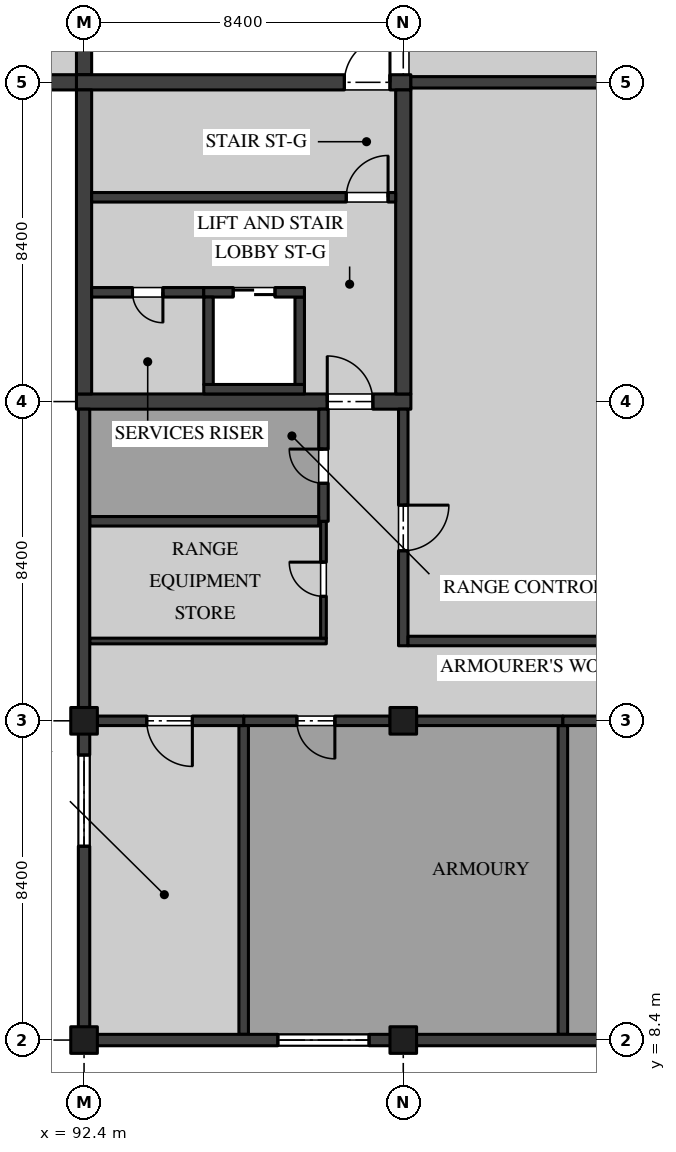
"""IFC4 building model, lengths in metres.
Left out: names, types, materials, properties, quantities, classifications, styles, units other than length and angle.
Written with IfcOpenShell. Run it as: python <this file> out.ifc"""

import sys

from ifc_helpers import new_model, si_unit, direction, frame, frame_2d, origin, origin_2d, place, context, subcontext, project, spatial, rectangle, extrude, element, fill, save


model = new_model("IFC4")
c1 = context("Model", 3, precision=1e-05, world=origin(), true_north=direction((0.0, 1.0)))
c2 = subcontext(c1, "Body", "Model", "MODEL_VIEW")
j1 = project(units=[si_unit("LENGTHUNIT", "METRE"), si_unit("PLANEANGLEUNIT", "RADIAN")], contexts=[c1])
p1 = place(None, origin())
s1 = spatial("IfcSite", under=j1, at=p1, CompositionType="ELEMENT")
p2 = place(p1, origin())
s2 = spatial("IfcBuilding", under=s1, at=p2, CompositionType="ELEMENT")
p3 = place(p2, origin())
s3 = spatial("IfcBuildingStorey", under=s2, at=p3, CompositionType="ELEMENT", Elevation=0.0)
for number, where, z_axis, x_axis in (
    (1, (92.4, 8.4, 0.0), (0.0, 0.0, 1.0), (1.0, 0.0, 0.0)),
    (2, (92.4, 16.8, 0.0), (0.0, 0.0, 1.0), (1.0, 0.0, 0.0)),
    (3, (100.8, 8.4, 0.0), (0.0, 0.0, 1.0), (1.0, 0.0, 0.0)),
    (4, (100.8, 16.8, 0.0), (0.0, 0.0, 1.0), (1.0, 0.0, 0.0)),
):
    element("IfcColumn", number, at=place(p3, frame(where, z_axis=z_axis, x_axis=x_axis)), inside=s3, PredefinedType="COLUMN", context=c2, shape_type="SweptSolid", body=[
        extrude(rectangle(XDim=0.7, YDim=0.7, at=origin_2d()), origin(), (0.0, 0.0, 1.0), 5.05),
    ])
p4 = place(p3, frame((83.8, 33.6, 0.0), z_axis=(0.0, 0.0, 1.0), x_axis=(1.0, 0.0, 0.0)))
e5 = element("IfcWall", 5, at=p4, inside=s3, PredefinedType="SHEAR", context=c2, shape_type="SweptSolid", body=[
    extrude(rectangle(XDim=8.8, YDim=0.4, at=frame_2d((4.4, 0.0))), origin(), (0.0, 0.0, 1.0), 5.05),
])
p5 = place(p4, frame((0.55, 0.0, 0.0)))
e6 = element("IfcOpeningElement", 6, at=p5, cuts=e5, PredefinedType="OPENING", context=c2, shape_type="SweptSolid", body=[
    extrude(rectangle(XDim=1.2, YDim=2.1, at=frame_2d((0.6, 1.05))), frame((0.0, 0.21, 0.0), z_axis=(0.0, -1.0, 0.0), x_axis=(1.0, 0.0, 0.0)), (0.0, 0.0, 1.0), 0.42),
])
p6 = place(p3, frame((92.4, 33.8, 0.0), z_axis=(0.0, 0.0, 1.0), x_axis=(0.0, 1.0, 0.0)))
e7 = element("IfcWall", 7, at=p6, inside=s3, PredefinedType="SHEAR", context=c2, shape_type="SweptSolid", body=[
    extrude(rectangle(XDim=8.0, YDim=0.4, at=frame_2d((4.0, 0.0))), origin(), (0.0, 0.0, 1.0), 5.05),
])
p7 = place(p3, frame((92.2, 25.2, 0.0), z_axis=(0.0, 0.0, 1.0), x_axis=(1.0, 0.0, 0.0)))
e8 = element("IfcWall", 8, at=p7, inside=s3, PredefinedType="SHEAR", context=c2, shape_type="SweptSolid", body=[
    extrude(rectangle(XDim=8.8, YDim=0.4, at=frame_2d((4.4, 0.0))), origin(), (0.0, 0.0, 1.0), 5.05),
])
p8 = place(p7, frame((6.6, 0.0, 0.0)))
e9 = element("IfcOpeningElement", 9, at=p8, cuts=e8, PredefinedType="OPENING", context=c2, shape_type="SweptSolid", body=[
    extrude(rectangle(XDim=1.2, YDim=2.1, at=frame_2d((0.6, 1.05))), frame((0.0, 0.21, 0.0), z_axis=(0.0, -1.0, 0.0), x_axis=(1.0, 0.0, 0.0)), (0.0, 0.0, 1.0), 0.42),
])
p9 = place(p3, frame((92.2, 33.6, 0.0), z_axis=(0.0, 0.0, 1.0), x_axis=(1.0, 0.0, 0.0)))
e10 = element("IfcWall", 10, at=p9, inside=s3, PredefinedType="SHEAR", context=c2, shape_type="SweptSolid", body=[
    extrude(rectangle(XDim=8.8, YDim=0.4, at=frame_2d((4.4, 0.0))), origin(), (0.0, 0.0, 1.0), 5.05),
])
p10 = place(p9, frame((7.05, 0.0, 0.0)))
e11 = element("IfcOpeningElement", 11, at=p10, cuts=e10, PredefinedType="OPENING", context=c2, shape_type="SweptSolid", body=[
    extrude(rectangle(XDim=1.2, YDim=2.1, at=frame_2d((0.6, 1.05))), frame((0.0, 0.21, 0.0), z_axis=(0.0, -1.0, 0.0), x_axis=(1.0, 0.0, 0.0)), (0.0, 0.0, 1.0), 0.42),
])
for number, where, z_axis, x_axis in (
    (12, (92.4, 25.4, 0.0), (0.0, 0.0, 1.0), (0.0, 1.0, 0.0)),
    (13, (100.8, 25.4, 0.0), (0.0, 0.0, 1.0), (0.0, 1.0, 0.0)),
):
    element("IfcWall", number, at=place(p3, frame(where, z_axis=z_axis, x_axis=x_axis)), inside=s3, PredefinedType="SHEAR", context=c2, shape_type="SweptSolid", body=[
        extrude(rectangle(XDim=8.0, YDim=0.4, at=frame_2d((4.0, 0.0))), origin(), (0.0, 0.0, 1.0), 5.05),
    ])
p11 = place(p3, frame((100.6, 30.575, 0.0), z_axis=(0.0, 0.0, 1.0), x_axis=(-1.0, 0.0, 0.0)))
e14 = element("IfcWall", 14, at=p11, inside=s3, PredefinedType="SOLIDWALL", context=c2, shape_type="SweptSolid", body=[
    extrude(rectangle(XDim=8.0, YDim=0.25, at=frame_2d((4.0, 0.0))), origin(), (0.0, 0.0, 1.0), 5.05),
])
p12 = place(p11, frame((0.2, 0.0, 0.0)))
e15 = element("IfcOpeningElement", 15, at=p12, cuts=e14, PredefinedType="OPENING", context=c2, shape_type="SweptSolid", body=[
    extrude(rectangle(XDim=1.1, YDim=2.1, at=frame_2d((0.55, 1.05))), frame((0.0, 0.135, 0.0), z_axis=(0.0, -1.0, 0.0), x_axis=(1.0, 0.0, 0.0)), (0.0, 0.0, 1.0), 0.27),
])
p13 = place(p3, frame((95.55, 28.075, 0.0), z_axis=(0.0, 0.0, 1.0), x_axis=(-1.0, 0.0, 0.0)))
e16 = element("IfcWall", 16, at=p13, inside=s3, PredefinedType="SOLIDWALL", context=c2, shape_type="SweptSolid", body=[
    extrude(rectangle(XDim=2.95, YDim=0.25, at=frame_2d((1.475, 0.0))), origin(), (0.0, 0.0, 1.0), 5.05),
])
p14 = place(p13, frame((1.075, 0.0, 0.0)))
e17 = element("IfcOpeningElement", 17, at=p14, cuts=e16, PredefinedType="OPENING", context=c2, shape_type="SweptSolid", body=[
    extrude(rectangle(XDim=0.8, YDim=2.1, at=frame_2d((0.4, 1.05))), frame((0.0, 0.135, 0.0), z_axis=(0.0, -1.0, 0.0), x_axis=(1.0, 0.0, 0.0)), (0.0, 0.0, 1.0), 0.27),
])
p15 = place(p3, frame((98.075, 25.65, 0.0), z_axis=(0.0, 0.0, 1.0), x_axis=(0.0, 1.0, 0.0)))
e18 = element("IfcWall", 18, at=p15, inside=s3, PredefinedType="SOLIDWALL", context=c2, shape_type="SweptSolid", body=[
    extrude(rectangle(XDim=2.3, YDim=0.25, at=frame_2d((1.15, 0.0))), origin(), (0.0, 0.0, 1.0), 5.05),
])
p16 = place(p3, frame((95.55, 28.075, 0.0), z_axis=(0.0, 0.0, 1.0), x_axis=(1.0, 0.0, 0.0)))
e19 = element("IfcWall", 19, at=p16, inside=s3, PredefinedType="SOLIDWALL", context=c2, shape_type="SweptSolid", body=[
    extrude(rectangle(XDim=2.65, YDim=0.25, at=frame_2d((1.325, 0.0))), origin(), (0.0, 0.0, 1.0), 5.05),
])
p17 = place(p16, frame((0.775, 0.0, 0.0)))
e20 = element("IfcOpeningElement", 20, at=p17, cuts=e19, PredefinedType="OPENING", context=c2, shape_type="SweptSolid", body=[
    extrude(rectangle(XDim=1.1, YDim=2.1, at=frame_2d((0.55, 1.05))), frame((0.0, 0.135, 0.0), z_axis=(0.0, -1.0, 0.0), x_axis=(1.0, 0.0, 0.0)), (0.0, 0.0, 1.0), 0.27),
])
p18 = place(p3, frame((95.55, 25.525, 0.0), z_axis=(0.0, 0.0, 1.0), x_axis=(1.0, 0.0, 0.0)))
e21 = element("IfcWall", 21, at=p18, inside=s3, PredefinedType="SOLIDWALL", context=c2, shape_type="SweptSolid", body=[
    extrude(rectangle(XDim=2.65, YDim=0.25, at=frame_2d((1.325, 0.0))), origin(), (0.0, 0.0, 1.0), 5.05),
])
p19 = place(p3, frame((95.675, 25.65, 0.0), z_axis=(0.0, 0.0, 1.0), x_axis=(0.0, 1.0, 0.0)))
e22 = element("IfcWall", 22, at=p19, inside=s3, PredefinedType="SOLIDWALL", context=c2, shape_type="SweptSolid", body=[
    extrude(rectangle(XDim=2.3, YDim=0.25, at=frame_2d((1.15, 0.0))), origin(), (0.0, 0.0, 1.0), 5.05),
])
p20 = place(p3, frame((105.0, 8.55, 0.0), z_axis=(0.0, 0.0, 1.0), x_axis=(0.0, 1.0, 0.0)))
e23 = element("IfcWall", 23, at=p20, inside=s3, PredefinedType="PARTITIONING", context=c2, shape_type="SweptSolid", body=[
    extrude(rectangle(XDim=8.125, YDim=0.25, at=frame_2d((4.062, 0.0))), origin(), (0.0, 0.0, 1.0), 5.05),
])
p21 = place(p3, frame((96.6, 16.8, 0.0), z_axis=(0.0, 0.0, 1.0), x_axis=(1.0, 0.0, 0.0)))
e24 = element("IfcWall", 24, at=p21, inside=s3, PredefinedType="PARTITIONING", context=c2, shape_type="SweptSolid", body=[
    extrude(rectangle(XDim=3.85, YDim=0.25, at=frame_2d((1.925, 0.0))), origin(), (0.0, 0.0, 1.0), 5.05),
])
p22 = place(p21, frame((1.4, 0.0, 0.0)))
e25 = element("IfcOpeningElement", 25, at=p22, cuts=e24, PredefinedType="OPENING", context=c2, shape_type="SweptSolid", body=[
    extrude(rectangle(XDim=1.0, YDim=2.1, at=frame_2d((0.5, 1.05))), frame((0.0, 0.135, 0.0), z_axis=(0.0, -1.0, 0.0), x_axis=(1.0, 0.0, 0.0)), (0.0, 0.0, 1.0), 0.27),
])
p23 = place(p3, frame((101.15, 16.8, 0.0), z_axis=(0.0, 0.0, 1.0), x_axis=(1.0, 0.0, 0.0)))
e26 = element("IfcWall", 26, at=p23, inside=s3, PredefinedType="PARTITIONING", context=c2, shape_type="SweptSolid", body=[
    extrude(rectangle(XDim=3.85, YDim=0.25, at=frame_2d((1.925, 0.0))), origin(), (0.0, 0.0, 1.0), 5.05),
])
p24 = place(p3, frame((96.6, 8.55, 0.0), z_axis=(0.0, 0.0, 1.0), x_axis=(0.0, 1.0, 0.0)))
e27 = element("IfcWall", 27, at=p24, inside=s3, PredefinedType="PARTITIONING", context=c2, shape_type="SweptSolid", body=[
    extrude(rectangle(XDim=8.125, YDim=0.25, at=frame_2d((4.062, 0.0))), origin(), (0.0, 0.0, 1.0), 5.05),
])
p25 = place(p3, frame((105.0, 16.8, 0.0), z_axis=(0.0, 0.0, 1.0), x_axis=(1.0, 0.0, 0.0)))
e28 = element("IfcWall", 28, at=p25, inside=s3, PredefinedType="PARTITIONING", context=c2, shape_type="SweptSolid", body=[
    extrude(rectangle(XDim=4.0, YDim=0.25, at=frame_2d((2.0, 0.0))), origin(), (0.0, 0.0, 1.0), 5.05),
])
p26 = place(p25, frame((1.1, 0.0, 0.0)))
e29 = element("IfcOpeningElement", 29, at=p26, cuts=e28, PredefinedType="OPENING", context=c2, shape_type="SweptSolid", body=[
    extrude(rectangle(XDim=1.8, YDim=2.7, at=frame_2d((0.9, 1.35))), frame((0.0, 0.135, 0.0), z_axis=(0.0, -1.0, 0.0), x_axis=(1.0, 0.0, 0.0)), (0.0, 0.0, 1.0), 0.27),
])
p27 = place(p3, frame((92.55, 18.9, 0.0), z_axis=(0.0, 0.0, 1.0), x_axis=(1.0, 0.0, 0.0)))
e30 = element("IfcWall", 30, at=p27, inside=s3, PredefinedType="PARTITIONING", context=c2, shape_type="SweptSolid", body=[
    extrude(rectangle(XDim=6.225, YDim=0.15, at=frame_2d((3.112, 0.0))), origin(), (0.0, 0.0, 1.0), 5.05),
])
p28 = place(p3, frame((98.7, 18.975, 0.0), z_axis=(0.0, 0.0, 1.0), x_axis=(0.0, 1.0, 0.0)))
e31 = element("IfcWall", 31, at=p28, inside=s3, PredefinedType="PARTITIONING", context=c2, shape_type="SweptSolid", body=[
    extrude(rectangle(XDim=3.075, YDim=0.15, at=frame_2d((1.538, 0.0))), origin(), (0.0, 0.0, 1.0), 5.05),
])
p29 = place(p28, frame((1.1, 0.0, 0.0)))
e32 = element("IfcOpeningElement", 32, at=p29, cuts=e31, PredefinedType="OPENING", context=c2, shape_type="SweptSolid", body=[
    extrude(rectangle(XDim=0.9, YDim=2.1, at=frame_2d((0.45, 1.05))), frame((0.0, 0.085, 0.0), z_axis=(0.0, -1.0, 0.0), x_axis=(1.0, 0.0, 0.0)), (0.0, 0.0, 1.0), 0.17),
])
p30 = place(p3, frame((98.7, 22.05, 0.0), z_axis=(0.0, 0.0, 1.0), x_axis=(0.0, 1.0, 0.0)))
e33 = element("IfcWall", 33, at=p30, inside=s3, PredefinedType="PARTITIONING", context=c2, shape_type="SweptSolid", body=[
    extrude(rectangle(XDim=2.95, YDim=0.25, at=frame_2d((1.475, 0.0))), origin(), (0.0, 0.0, 1.0), 5.05),
])
p31 = place(p30, frame((1.0, 0.0, 0.0)))
e34 = element("IfcOpeningElement", 34, at=p31, cuts=e33, PredefinedType="OPENING", context=c2, shape_type="SweptSolid", body=[
    extrude(rectangle(XDim=0.9, YDim=2.1, at=frame_2d((0.45, 1.05))), frame((0.0, 0.135, 0.0), z_axis=(0.0, -1.0, 0.0), x_axis=(1.0, 0.0, 0.0)), (0.0, 0.0, 1.0), 0.27),
])
p32 = place(p3, frame((100.8, 18.775, 0.0), z_axis=(0.0, 0.0, 1.0), x_axis=(0.0, 1.0, 0.0)))
e35 = element("IfcWall", 35, at=p32, inside=s3, PredefinedType="PARTITIONING", context=c2, shape_type="SweptSolid", body=[
    extrude(rectangle(XDim=6.225, YDim=0.25, at=frame_2d((3.113, 0.0))), origin(), (0.0, 0.0, 1.0), 5.05),
])
p33 = place(p32, frame((2.5, 0.0, 0.0)))
e36 = element("IfcOpeningElement", 36, at=p33, cuts=e35, PredefinedType="OPENING", context=c2, shape_type="SweptSolid", body=[
    extrude(rectangle(XDim=1.2, YDim=2.1, at=frame_2d((0.6, 1.05))), frame((0.0, 0.135, 0.0), z_axis=(0.0, -1.0, 0.0), x_axis=(1.0, 0.0, 0.0)), (0.0, 0.0, 1.0), 0.27),
])
p34 = place(p3, frame((100.925, 18.9, 0.0), z_axis=(0.0, 0.0, 1.0), x_axis=(1.0, 0.0, 0.0)))
e37 = element("IfcWall", 37, at=p34, inside=s3, PredefinedType="PARTITIONING", context=c2, shape_type="SweptSolid", body=[
    extrude(rectangle(XDim=16.55, YDim=0.25, at=frame_2d((8.275, 0.0))), origin(), (0.0, 0.0, 1.0), 5.05),
])
p35 = place(p34, frame((7.65, 0.0, 0.0)))
e38 = element("IfcOpeningElement", 38, at=p35, cuts=e37, PredefinedType="OPENING", context=c2, shape_type="SweptSolid", body=[
    extrude(rectangle(XDim=1.2, YDim=2.1, at=frame_2d((0.6, 1.05))), frame((0.0, 0.135, 0.0), z_axis=(0.0, -1.0, 0.0), x_axis=(1.0, 0.0, 0.0)), (0.0, 0.0, 1.0), 0.27),
])
p36 = place(p3, frame((92.75, 16.8, 0.0), z_axis=(0.0, 0.0, 1.0), x_axis=(1.0, 0.0, 0.0)))
e39 = element("IfcWall", 39, at=p36, inside=s3, PredefinedType="PARTITIONING", context=c2, shape_type="SweptSolid", body=[
    extrude(rectangle(XDim=3.85, YDim=0.25, at=frame_2d((1.925, 0.0))), origin(), (0.0, 0.0, 1.0), 5.05),
])
p37 = place(p36, frame((1.3, 0.0, 0.0)))
e40 = element("IfcOpeningElement", 40, at=p37, cuts=e39, PredefinedType="OPENING", context=c2, shape_type="SweptSolid", body=[
    extrude(rectangle(XDim=1.2, YDim=2.4, at=frame_2d((0.6, 1.2))), frame((0.0, 0.135, 0.0), z_axis=(0.0, -1.0, 0.0), x_axis=(1.0, 0.0, 0.0)), (0.0, 0.0, 1.0), 0.27),
])
p38 = place(p3, frame((92.55, 22.05, 0.0), z_axis=(0.0, 0.0, 1.0), x_axis=(1.0, 0.0, 0.0)))
e41 = element("IfcWall", 41, at=p38, inside=s3, PredefinedType="PARTITIONING", context=c2, shape_type="SweptSolid", body=[
    extrude(rectangle(XDim=6.025, YDim=0.25, at=frame_2d((3.012, 0.0))), origin(), (0.0, 0.0, 1.0), 5.05),
])
p39 = place(p3, frame((92.4, 25.0, 0.0), z_axis=(0.0, 0.0, 1.0), x_axis=(0.0, -1.0, 0.0)))
e42 = element("IfcWall", 42, at=p39, inside=s3, PredefinedType="SOLIDWALL", context=c2, shape_type="SweptSolid", body=[
    extrude(rectangle(XDim=7.87, YDim=0.3, at=frame_2d((3.935, 0.0))), origin(), (0.0, 0.0, 1.0), 5.05),
])
p40 = place(p3, frame((92.4, 16.47, 0.0), z_axis=(0.0, 0.0, 1.0), x_axis=(0.0, -1.0, 0.0)))
e43 = element("IfcWall", 43, at=p40, inside=s3, PredefinedType="SOLIDWALL", context=c2, shape_type="SweptSolid", body=[
    extrude(rectangle(XDim=7.74, YDim=0.3, at=frame_2d((3.87, 0.0))), origin(), (0.0, 0.0, 1.0), 5.05),
])
p41 = place(p40, frame((0.57, 0.0, 0.6)))
e44 = element("IfcOpeningElement", 44, at=p41, cuts=e43, PredefinedType="OPENING", context=c2, shape_type="SweptSolid", body=[
    extrude(rectangle(XDim=2.4, YDim=2.1, at=frame_2d((1.2, 1.05))), frame((0.0, 0.16, 0.0), z_axis=(0.0, -1.0, 0.0), x_axis=(1.0, 0.0, 0.0)), (0.0, 0.0, 1.0), 0.32),
])
p42 = place(p3, frame((92.73, 8.4, 0.0), z_axis=(0.0, 0.0, 1.0), x_axis=(1.0, 0.0, 0.0)))
e45 = element("IfcWall", 45, at=p42, inside=s3, PredefinedType="SOLIDWALL", context=c2, shape_type="SweptSolid", body=[
    extrude(rectangle(XDim=7.74, YDim=0.3, at=frame_2d((3.87, 0.0))), origin(), (0.0, 0.0, 1.0), 5.05),
])
p43 = place(p42, frame((4.77, 0.0, 0.6)))
e46 = element("IfcOpeningElement", 46, at=p43, cuts=e45, PredefinedType="OPENING", context=c2, shape_type="SweptSolid", body=[
    extrude(rectangle(XDim=2.4, YDim=2.1, at=frame_2d((1.2, 1.05))), frame((0.0, 0.16, 0.0), z_axis=(0.0, -1.0, 0.0), x_axis=(1.0, 0.0, 0.0)), (0.0, 0.0, 1.0), 0.32),
])
p44 = place(p3, frame((101.13, 8.4, 0.0), z_axis=(0.0, 0.0, 1.0), x_axis=(1.0, 0.0, 0.0)))
e47 = element("IfcWall", 47, at=p44, inside=s3, PredefinedType="SOLIDWALL", context=c2, shape_type="SweptSolid", body=[
    extrude(rectangle(XDim=7.87, YDim=0.3, at=frame_2d((3.935, 0.0))), origin(), (0.0, 0.0, 1.0), 5.05),
])
p45 = place(p3, frame((109.0, 33.6, 0.0), z_axis=(0.0, 0.0, 1.0), x_axis=(-1.0, 0.0, 0.0)))
e48 = element("IfcWall", 48, at=p45, inside=s3, PredefinedType="SOLIDWALL", context=c2, shape_type="SweptSolid", body=[
    extrude(rectangle(XDim=8.0, YDim=0.3, at=frame_2d((4.0, 0.0))), origin(), (0.0, 0.0, 1.0), 5.05),
])
p46 = place(p8, origin())
e49 = element("IfcDoor", 49, at=p46, inside=s3, OperationType="SINGLE_SWING_RIGHT", PredefinedType="DOOR", context=c2, shape_type="SweptSolid", body=[
    extrude(rectangle(XDim=1.2, YDim=2.1, at=frame_2d((0.6, 1.05))), frame((0.0, 0.035, 0.0), z_axis=(0.0, -1.0, 0.0), x_axis=(1.0, 0.0, 0.0)), (0.0, 0.0, 1.0), 0.07),
])
fill(e9, e49)
p47 = place(p14, origin())
e50 = element("IfcDoor", 50, at=p47, inside=s3, OperationType="SINGLE_SWING_RIGHT", PredefinedType="DOOR", context=c2, shape_type="SweptSolid", body=[
    extrude(rectangle(XDim=0.8, YDim=2.1, at=frame_2d((0.4, 1.05))), frame((0.0, 0.035, 0.0), z_axis=(0.0, -1.0, 0.0), x_axis=(1.0, 0.0, 0.0)), (0.0, 0.0, 1.0), 0.07),
])
fill(e17, e50)
p48 = place(p12, frame((1.1, 0.0, 0.0), z_axis=(0.0, 0.0, 1.0), x_axis=(-1.0, 0.0, 0.0)))
e51 = element("IfcDoor", 51, at=p48, inside=s3, OperationType="SINGLE_SWING_LEFT", PredefinedType="DOOR", context=c2, shape_type="SweptSolid", body=[
    extrude(rectangle(XDim=1.1, YDim=2.1, at=frame_2d((0.55, 1.05))), frame((0.0, 0.035, 0.0), z_axis=(0.0, -1.0, 0.0), x_axis=(1.0, 0.0, 0.0)), (0.0, 0.0, 1.0), 0.07),
])
fill(e15, e51)
p49 = place(p10, origin())
e52 = element("IfcDoor", 52, at=p49, inside=s3, OperationType="SINGLE_SWING_LEFT", PredefinedType="DOOR", context=c2, shape_type="SweptSolid", body=[
    extrude(rectangle(XDim=1.2, YDim=2.1, at=frame_2d((0.6, 1.05))), frame((0.0, 0.035, 0.0), z_axis=(0.0, -1.0, 0.0), x_axis=(1.0, 0.0, 0.0)), (0.0, 0.0, 1.0), 0.07),
])
fill(e11, e52)
p50 = place(p17, origin())
e53 = element("IfcDoor", 53, at=p50, inside=s3, OperationType="DOUBLE_DOOR_SLIDING", PredefinedType="DOOR", context=c2, shape_type="SweptSolid", body=[
    extrude(rectangle(XDim=1.1, YDim=2.1, at=frame_2d((0.55, 1.05))), frame((0.0, 0.04, 0.0), z_axis=(0.0, -1.0, 0.0), x_axis=(1.0, 0.0, 0.0)), (0.0, 0.0, 1.0), 0.08),
])
fill(e20, e53)
p51 = place(p22, frame((1.0, 0.0, 0.0), z_axis=(0.0, 0.0, 1.0), x_axis=(-1.0, 0.0, 0.0)))
e54 = element("IfcDoor", 54, at=p51, inside=s3, OperationType="SINGLE_SWING_RIGHT", PredefinedType="DOOR", context=c2, shape_type="SweptSolid", body=[
    extrude(rectangle(XDim=1.0, YDim=2.1, at=frame_2d((0.5, 1.05))), frame((0.0, 0.06, 0.0), z_axis=(0.0, -1.0, 0.0), x_axis=(1.0, 0.0, 0.0)), (0.0, 0.0, 1.0), 0.12),
])
fill(e25, e54)
p52 = place(p29, origin())
e55 = element("IfcDoor", 55, at=p52, inside=s3, OperationType="SINGLE_SWING_LEFT", PredefinedType="DOOR", context=c2, shape_type="SweptSolid", body=[
    extrude(rectangle(XDim=0.9, YDim=2.1, at=frame_2d((0.45, 1.05))), frame((0.0, 0.025, 0.0), z_axis=(0.0, -1.0, 0.0), x_axis=(1.0, 0.0, 0.0)), (0.0, 0.0, 1.0), 0.05),
])
fill(e32, e55)
p53 = place(p31, origin())
e56 = element("IfcDoor", 56, at=p53, inside=s3, OperationType="SINGLE_SWING_LEFT", PredefinedType="DOOR", context=c2, shape_type="SweptSolid", body=[
    extrude(rectangle(XDim=0.9, YDim=2.1, at=frame_2d((0.45, 1.05))), frame((0.0, 0.05, 0.0), z_axis=(0.0, -1.0, 0.0), x_axis=(1.0, 0.0, 0.0)), (0.0, 0.0, 1.0), 0.1),
])
fill(e34, e56)
p54 = place(p33, frame((1.2, 0.0, 0.0), z_axis=(0.0, 0.0, 1.0), x_axis=(-1.0, 0.0, 0.0)))
e57 = element("IfcDoor", 57, at=p54, inside=s3, OperationType="SINGLE_SWING_RIGHT", PredefinedType="DOOR", context=c2, shape_type="SweptSolid", body=[
    extrude(rectangle(XDim=1.2, YDim=2.1, at=frame_2d((0.6, 1.05))), frame((0.0, 0.045, 0.0), z_axis=(0.0, -1.0, 0.0), x_axis=(1.0, 0.0, 0.0)), (0.0, 0.0, 1.0), 0.09),
])
fill(e36, e57)
p55 = place(p37, frame((1.2, 0.0, 0.0), z_axis=(0.0, 0.0, 1.0), x_axis=(-1.0, 0.0, 0.0)))
e58 = element("IfcDoor", 58, at=p55, inside=s3, OperationType="SINGLE_SWING_RIGHT", PredefinedType="DOOR", context=c2, shape_type="SweptSolid", body=[
    extrude(rectangle(XDim=1.2, YDim=2.4, at=frame_2d((0.6, 1.2))), frame((0.0, 0.05, 0.0), z_axis=(0.0, -1.0, 0.0), x_axis=(1.0, 0.0, 0.0)), (0.0, 0.0, 1.0), 0.1),
])
fill(e40, e58)
p56 = place(p41, origin())
e59 = element("IfcWindow", 59, at=p56, inside=s3, PartitioningType="SINGLE_PANEL", PredefinedType="WINDOW", context=c2, shape_type="SweptSolid", body=[
    extrude(rectangle(XDim=2.4, YDim=2.1, at=frame_2d((1.2, 1.05))), frame((0.0, 0.06, 0.0), z_axis=(0.0, -1.0, 0.0), x_axis=(1.0, 0.0, 0.0)), (0.0, 0.0, 1.0), 0.12),
])
fill(e44, e59)
p57 = place(p43, origin())
e60 = element("IfcWindow", 60, at=p57, inside=s3, PartitioningType="SINGLE_PANEL", PredefinedType="WINDOW", context=c2, shape_type="SweptSolid", body=[
    extrude(rectangle(XDim=2.4, YDim=2.1, at=frame_2d((1.2, 1.05))), frame((0.0, 0.06, 0.0), z_axis=(0.0, -1.0, 0.0), x_axis=(1.0, 0.0, 0.0)), (0.0, 0.0, 1.0), 0.12),
])
fill(e46, e60)
save(model, sys.argv[1])
